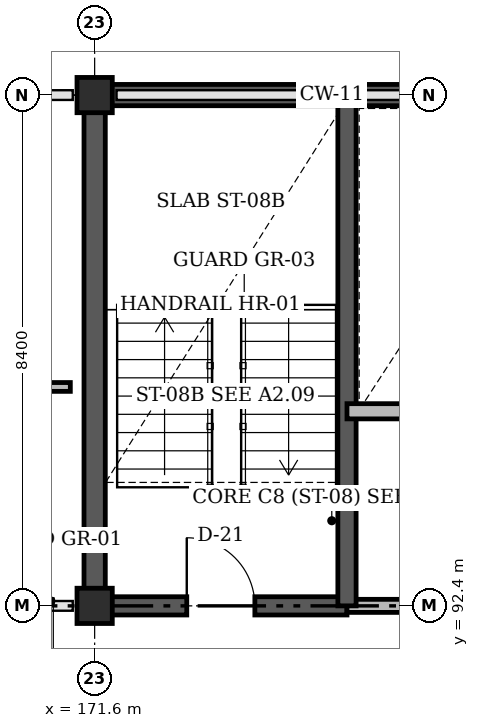
"""IFC4 building model, lengths in metres.
Left out: names, types, materials, properties, quantities, classifications, styles, units other than length and angle.
Written with IfcOpenShell. Run it as: python <this file> out.ifc"""

import sys

from ifc_helpers import new_model, si_unit, direction, frame, frame_2d, origin, origin_2d, place, context, subcontext, project, spatial, rectangle, extrude, element, fill, save


model = new_model("IFC4")
c1 = context("Model", 3, precision=1e-05, world=origin(), true_north=direction((0.0, 1.0)))
c2 = subcontext(c1, "Body", "Model", "MODEL_VIEW")
j1 = project(units=[si_unit("LENGTHUNIT", "METRE"), si_unit("PLANEANGLEUNIT", "RADIAN")], contexts=[c1])
p1 = place(None, origin())
s1 = spatial("IfcSite", under=j1, at=p1, CompositionType="ELEMENT")
p2 = place(p1, origin())
s2 = spatial("IfcBuilding", under=s1, at=p2, CompositionType="ELEMENT")
p3 = place(p2, frame((0.0, 0.0, 14.4)))
s3 = spatial("IfcBuildingStorey", under=s2, at=p3, CompositionType="ELEMENT", Elevation=14.4)
p4 = place(p3, frame((171.425, 100.8, 0.0), z_axis=(0.0, 0.0, 1.0), x_axis=(1.0, 0.0, 0.0)))
e1 = element("IfcWall", 1, at=p4, inside=s3, PredefinedType="SHEAR", context=c2, shape_type="SweptSolid", body=[
    extrude(rectangle(XDim=8.15, YDim=0.35, at=frame_2d((4.075, 0.0))), origin(), (0.0, 0.0, 1.0), 3.28),
])
p5 = place(p3, frame((171.6, 92.4, 0.0), z_axis=(0.0, 0.0, 1.0), x_axis=(0.0, 1.0, 0.0)))
e2 = element("IfcWall", 2, at=p5, inside=s3, PredefinedType="SHEAR", context=c2, shape_type="SweptSolid", body=[
    extrude(rectangle(XDim=8.4, YDim=0.35, at=frame_2d((4.2, 0.0))), origin(), (0.0, 0.0, 1.0), 3.28),
])
for number, where, z_axis, x_axis in (
    (3, (171.6, 92.4, 0.0), (0.0, 0.0, 1.0), (1.0, 0.0, 0.0)),
    (4, (171.6, 100.8, 0.0), (0.0, 0.0, 1.0), (1.0, 0.0, 0.0)),
):
    element("IfcColumn", number, at=place(p3, frame(where, z_axis=z_axis, x_axis=x_axis)), inside=s3, PredefinedType="COLUMN", context=c2, shape_type="SweptSolid", body=[
        extrude(rectangle(XDim=0.58, YDim=0.58, at=origin_2d()), origin(), (0.0, 0.0, 1.0), 3.6),
    ])
p6 = place(p3, frame((171.6, 92.4, 0.0), z_axis=(0.0, 0.0, 1.0), x_axis=(1.0, 0.0, 0.0)))
e5 = element("IfcWall", 5, at=p6, inside=s3, PredefinedType="SHEAR", context=c2, shape_type="SweptSolid", body=[
    extrude(rectangle(XDim=4.15, YDim=0.3, at=frame_2d((2.075, 0.0))), origin(), (0.0, 0.0, 1.0), 3.6),
])
p7 = place(p6, frame((1.515, 0.0, 0.0)))
e6 = element("IfcOpeningElement", 6, at=p7, cuts=e5, PredefinedType="OPENING", context=c2, shape_type="SweptSolid", body=[
    extrude(rectangle(XDim=1.12, YDim=2.15, at=frame_2d((0.56, 1.075))), frame((0.0, 0.16, 0.0), z_axis=(0.0, -1.0, 0.0), x_axis=(1.0, 0.0, 0.0)), (0.0, 0.0, 1.0), 0.32),
])
p8 = place(p3, frame((175.75, 92.4, 0.0), z_axis=(0.0, 0.0, 1.0), x_axis=(1.0, 0.0, 0.0)))
e7 = element("IfcWall", 7, at=p8, inside=s3, PredefinedType="STANDARD", context=c2, shape_type="SweptSolid", body=[
    extrude(rectangle(XDim=3.29, YDim=0.215, at=frame_2d((1.645, 0.0))), origin(), (0.0, 0.0, 1.0), 2.62),
])
p9 = place(p8, frame((0.925, 0.0, 0.0)))
e8 = element("IfcOpeningElement", 8, at=p9, cuts=e7, PredefinedType="OPENING", context=c2, shape_type="SweptSolid", body=[
    extrude(rectangle(XDim=1.44, YDim=2.2, at=frame_2d((0.72, 1.1))), frame((0.0, 0.118, 0.0), z_axis=(0.0, -1.0, 0.0), x_axis=(1.0, 0.0, 0.0)), (0.0, 0.0, 1.0), 0.235),
])
p10 = place(p3, frame((175.75, 92.4, 0.0), z_axis=(0.0, 0.0, 1.0), x_axis=(0.0, 1.0, 0.0)))
e9 = element("IfcWall", 9, at=p10, inside=s3, PredefinedType="SHEAR", context=c2, shape_type="SweptSolid", body=[
    extrude(rectangle(XDim=8.4, YDim=0.3, at=frame_2d((4.2, 0.0))), origin(), (0.0, 0.0, 1.0), 3.6),
])
p11 = place(p3, frame((175.75, 95.6, 0.0), z_axis=(0.0, 0.0, 1.0), x_axis=(1.0, 0.0, 0.0)))
e10 = element("IfcWall", 10, at=p11, inside=s3, PredefinedType="STANDARD", context=c2, shape_type="SweptSolid", body=[
    extrude(rectangle(XDim=3.5, YDim=0.25, at=frame_2d((1.75, 0.0))), origin(), (0.0, 0.0, 1.0), 3.3),
])
p12 = place(p11, frame((1.2, 0.0, 0.0)))
e11 = element("IfcOpeningElement", 11, at=p12, cuts=e10, PredefinedType="OPENING", context=c2, shape_type="SweptSolid", body=[
    extrude(rectangle(XDim=1.1, YDim=2.2, at=frame_2d((0.55, 1.1))), frame((0.0, 0.135, 0.0), z_axis=(0.0, -1.0, 0.0), x_axis=(1.0, 0.0, 0.0)), (0.0, 0.0, 1.0), 0.27),
])
p13 = place(p3, frame((148.0, 96.0, 0.0), z_axis=(0.0, 0.0, 1.0), x_axis=(1.0, 0.0, 0.0)))
e12 = element("IfcWall", 12, at=p13, inside=s3, PredefinedType="PARTITIONING", context=c2, shape_type="SweptSolid", body=[
    extrude(rectangle(XDim=23.2, YDim=0.145, at=frame_2d((11.6, 0.0))), origin(), (0.0, 0.0, 1.0), 3.3),
])
p14 = place(p7, origin())
e13 = element("IfcDoor", 13, at=p14, inside=s3, OperationType="SINGLE_SWING_LEFT", PredefinedType="DOOR", context=c2, shape_type="SweptSolid", body=[
    extrude(rectangle(XDim=1.12, YDim=2.15, at=frame_2d((0.56, 1.075))), frame((0.0, 0.025, 0.0), z_axis=(0.0, -1.0, 0.0), x_axis=(1.0, 0.0, 0.0)), (0.0, 0.0, 1.0), 0.05),
])
fill(e6, e13)
save(model, sys.argv[1])
